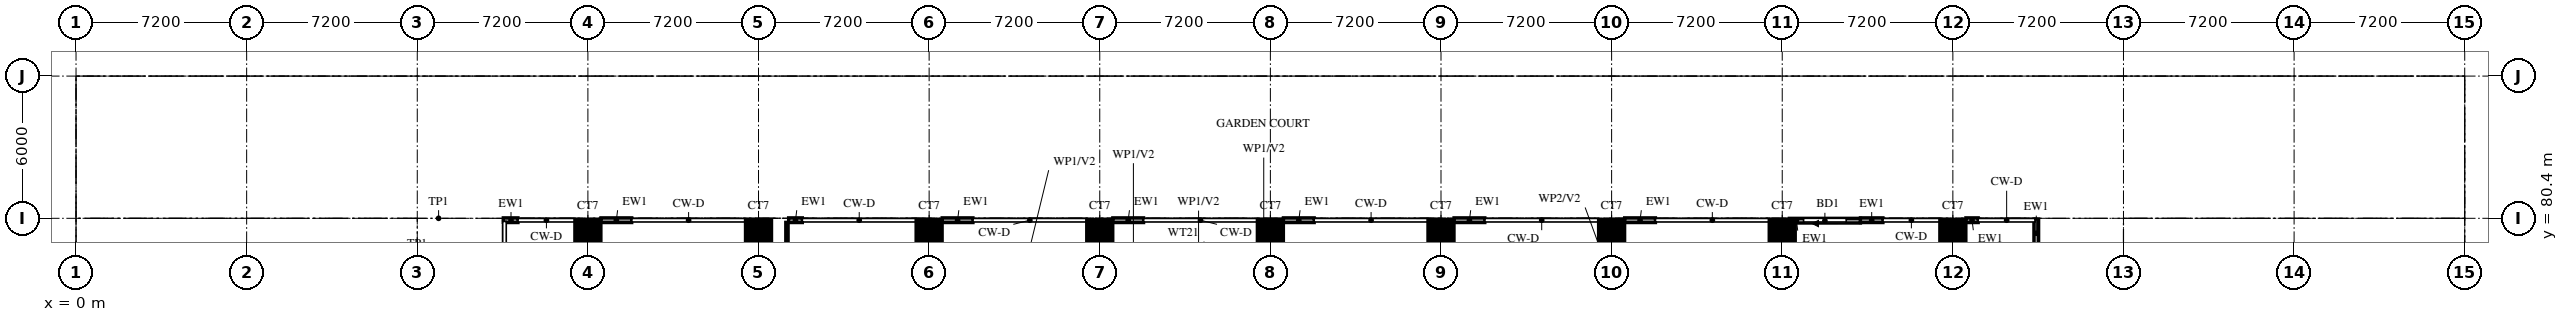
"""IFC4 building model, lengths in metres.
Left out: names, types, materials, properties, quantities, classifications, styles, units other than length and angle.
Written with IfcOpenShell. Run it as: python <this file> out.ifc"""

import sys

from ifc_helpers import new_model, si_unit, direction, frame, frame_2d, origin, origin_2d, place, context, subcontext, project, spatial, rectangle, extrude, source, transform, mapped, element, fill, save


model = new_model("IFC4")
c1 = context("Model", 3, precision=1e-05, world=origin(), true_north=direction((0.0, 1.0)))
c2 = subcontext(c1, "Body", "Model", "MODEL_VIEW")
j1 = project(units=[si_unit("LENGTHUNIT", "METRE"), si_unit("PLANEANGLEUNIT", "RADIAN")], contexts=[c1])
p1 = place(None, origin())
s1 = spatial("IfcSite", under=j1, at=p1, CompositionType="ELEMENT")
p2 = place(p1, origin())
s2 = spatial("IfcBuilding", under=s1, at=p2, CompositionType="ELEMENT")
p3 = place(p2, frame((0.0, 0.0, 27.0)))
s3 = spatial("IfcBuildingStorey", under=s2, at=p3, CompositionType="ELEMENT", Elevation=27.0)
m1 = source(origin(), c2, "Body", "SweptSolid", [
    extrude(rectangle(XDim=1.1, YDim=1.1, at=origin_2d()), origin(), (0.0, 0.0, 1.0), 3.18),
])
for number, where, z_axis, x_axis in (
    (1, (21.6, 79.8, 0.0), (0.0, 0.0, 1.0), (1.0, 0.0, 0.0)),
    (2, (28.8, 79.8, 0.0), (0.0, 0.0, 1.0), (1.0, 0.0, 0.0)),
    (3, (36.0, 79.8, 0.0), (0.0, 0.0, 1.0), (1.0, 0.0, 0.0)),
    (4, (43.2, 79.8, 0.0), (0.0, 0.0, 1.0), (1.0, 0.0, 0.0)),
    (5, (50.4, 79.8, 0.0), (0.0, 0.0, 1.0), (1.0, 0.0, 0.0)),
    (6, (57.6, 79.8, 0.0), (0.0, 0.0, 1.0), (1.0, 0.0, 0.0)),
    (7, (64.8, 79.8, 0.0), (0.0, 0.0, 1.0), (1.0, 0.0, 0.0)),
    (8, (72.0, 79.8, 0.0), (0.0, 0.0, 1.0), (1.0, 0.0, 0.0)),
    (9, (79.2, 79.8, 0.0), (0.0, 0.0, 1.0), (1.0, 0.0, 0.0)),
):
    element("IfcColumn", number, at=place(p3, frame(where, z_axis=z_axis, x_axis=x_axis)), inside=s3, PredefinedType="COLUMN", context=c2, shape_type="MappedRepresentation", body=[
        mapped(m1, transform((0.0, 0.0, 0.0))),
    ])
p4 = place(p3, frame((82.72, 79.17, 0.0), z_axis=(0.0, 0.0, 1.0), x_axis=(0.0, 1.0, 0.0)))
e10 = element("IfcWall", 10, at=p4, inside=s3, PredefinedType="SOLIDWALL", context=c2, shape_type="SweptSolid", body=[
    extrude(rectangle(XDim=1.2, YDim=0.2, at=frame_2d((0.6, 0.0))), origin(), (0.0, 0.0, 1.0), 3.18),
])
p5 = place(p3, frame((75.3, 80.3, 0.0), z_axis=(0.0, 0.0, 1.0), x_axis=(-1.0, 0.0, 0.0)))
e11 = element("IfcWall", 11, at=p5, inside=s3, PredefinedType="SOLIDWALL", context=c2, shape_type="SweptSolid", body=[
    extrude(rectangle(XDim=3.0, YDim=0.2, at=frame_2d((1.5, 0.0))), origin(), (0.0, 0.0, 1.0), 3.18),
])
p6 = place(p5, frame((0.6, 0.0, 0.0)))
e12 = element("IfcOpeningElement", 12, at=p6, cuts=e11, PredefinedType="OPENING", context=c2, shape_type="SweptSolid", body=[
    extrude(rectangle(XDim=1.8, YDim=2.4, at=frame_2d((0.9, 1.2))), frame((0.0, 0.11, 0.0), z_axis=(0.0, -1.0, 0.0), x_axis=(1.0, 0.0, 0.0)), (0.0, 0.0, 1.0), 0.22),
])
p7 = place(p3, frame((80.27, 80.32, 0.0), z_axis=(0.0, 0.0, 1.0), x_axis=(-1.0, 0.0, 0.0)))
e13 = element("IfcWall", 13, at=p7, inside=s3, PredefinedType="SOLIDWALL", context=c2, shape_type="SweptSolid", body=[
    extrude(rectangle(XDim=0.52, YDim=0.2, at=frame_2d((0.26, 0.0))), origin(), (0.0, 0.0, 1.0), 3.18),
])
p8 = place(p3, frame((76.25, 80.32, 0.0), z_axis=(0.0, 0.0, 1.0), x_axis=(-1.0, 0.0, 0.0)))
e14 = element("IfcWall", 14, at=p8, inside=s3, PredefinedType="SOLIDWALL", context=c2, shape_type="SweptSolid", body=[
    extrude(rectangle(XDim=0.95, YDim=0.2, at=frame_2d((0.475, 0.0))), origin(), (0.0, 0.0, 1.0), 3.18),
])
p9 = place(p3, frame((66.65, 80.32, 0.0), z_axis=(0.0, 0.0, 1.0), x_axis=(-1.0, 0.0, 0.0)))
e15 = element("IfcWall", 15, at=p9, inside=s3, PredefinedType="SOLIDWALL", context=c2, shape_type="SweptSolid", body=[
    extrude(rectangle(XDim=1.3, YDim=0.2, at=frame_2d((0.65, 0.0))), origin(), (0.0, 0.0, 1.0), 3.18),
])
for number, where, z_axis, x_axis in (
    (16, (59.45, 80.32, 0.0), (0.0, 0.0, 1.0), (-1.0, 0.0, 0.0)),
    (17, (52.25, 80.32, 0.0), (0.0, 0.0, 1.0), (-1.0, 0.0, 0.0)),
    (18, (45.05, 80.32, 0.0), (0.0, 0.0, 1.0), (-1.0, 0.0, 0.0)),
    (19, (37.85, 80.32, 0.0), (0.0, 0.0, 1.0), (-1.0, 0.0, 0.0)),
):
    element("IfcWall", number, at=place(p3, frame(where, z_axis=z_axis, x_axis=x_axis)), inside=s3, PredefinedType="SOLIDWALL", context=c2, shape_type="SweptSolid", body=[
        extrude(rectangle(XDim=1.3, YDim=0.2, at=frame_2d((0.65, 0.0))), origin(), (0.0, 0.0, 1.0), 3.18),
    ])
p10 = place(p3, frame((30.65, 80.32, 0.0), z_axis=(0.0, 0.0, 1.0), x_axis=(-1.0, 0.0, 0.0)))
e20 = element("IfcWall", 20, at=p10, inside=s3, PredefinedType="SOLIDWALL", context=c2, shape_type="SweptSolid", body=[
    extrude(rectangle(XDim=0.58, YDim=0.2, at=frame_2d((0.29, 0.0))), origin(), (0.0, 0.0, 1.0), 3.18),
])
p11 = place(p3, frame((23.45, 80.32, 0.0), z_axis=(0.0, 0.0, 1.0), x_axis=(-1.0, 0.0, 0.0)))
e21 = element("IfcWall", 21, at=p11, inside=s3, PredefinedType="SOLIDWALL", context=c2, shape_type="SweptSolid", body=[
    extrude(rectangle(XDim=1.3, YDim=0.2, at=frame_2d((0.65, 0.0))), origin(), (0.0, 0.0, 1.0), 3.18),
])
p12 = place(p3, frame((18.65, 80.32, 0.0), z_axis=(0.0, 0.0, 1.0), x_axis=(-1.0, 0.0, 0.0)))
e22 = element("IfcWall", 22, at=p12, inside=s3, PredefinedType="SOLIDWALL", context=c2, shape_type="SweptSolid", body=[
    extrude(rectangle(XDim=0.62, YDim=0.2, at=frame_2d((0.31, 0.0))), origin(), (0.0, 0.0, 1.0), 3.18),
])
p13 = place(p3, frame((30.0, 78.002, 0.0), z_axis=(0.0, 0.0, 1.0), x_axis=(0.0, 1.0, 0.0)))
e23 = element("IfcWall", 23, at=p13, inside=s3, PredefinedType="PARTITIONING", context=c2, shape_type="SweptSolid", body=[
    extrude(rectangle(XDim=2.228, YDim=0.1, at=frame_2d((1.114, 0.0))), origin(), (0.0, 0.0, 1.0), 2.28),
])
p14 = place(p6, origin())
e24 = element("IfcDoor", 24, at=p14, inside=s3, OperationType="DOUBLE_DOOR_SLIDING", PredefinedType="DOOR", context=c2, shape_type="SweptSolid", body=[
    extrude(rectangle(XDim=1.8, YDim=2.4, at=frame_2d((0.9, 1.2))), frame((0.0, 0.025, 0.0), z_axis=(0.0, -1.0, 0.0), x_axis=(1.0, 0.0, 0.0)), (0.0, 0.0, 1.0), 0.05),
])
fill(e12, e24)
save(model, sys.argv[1])
